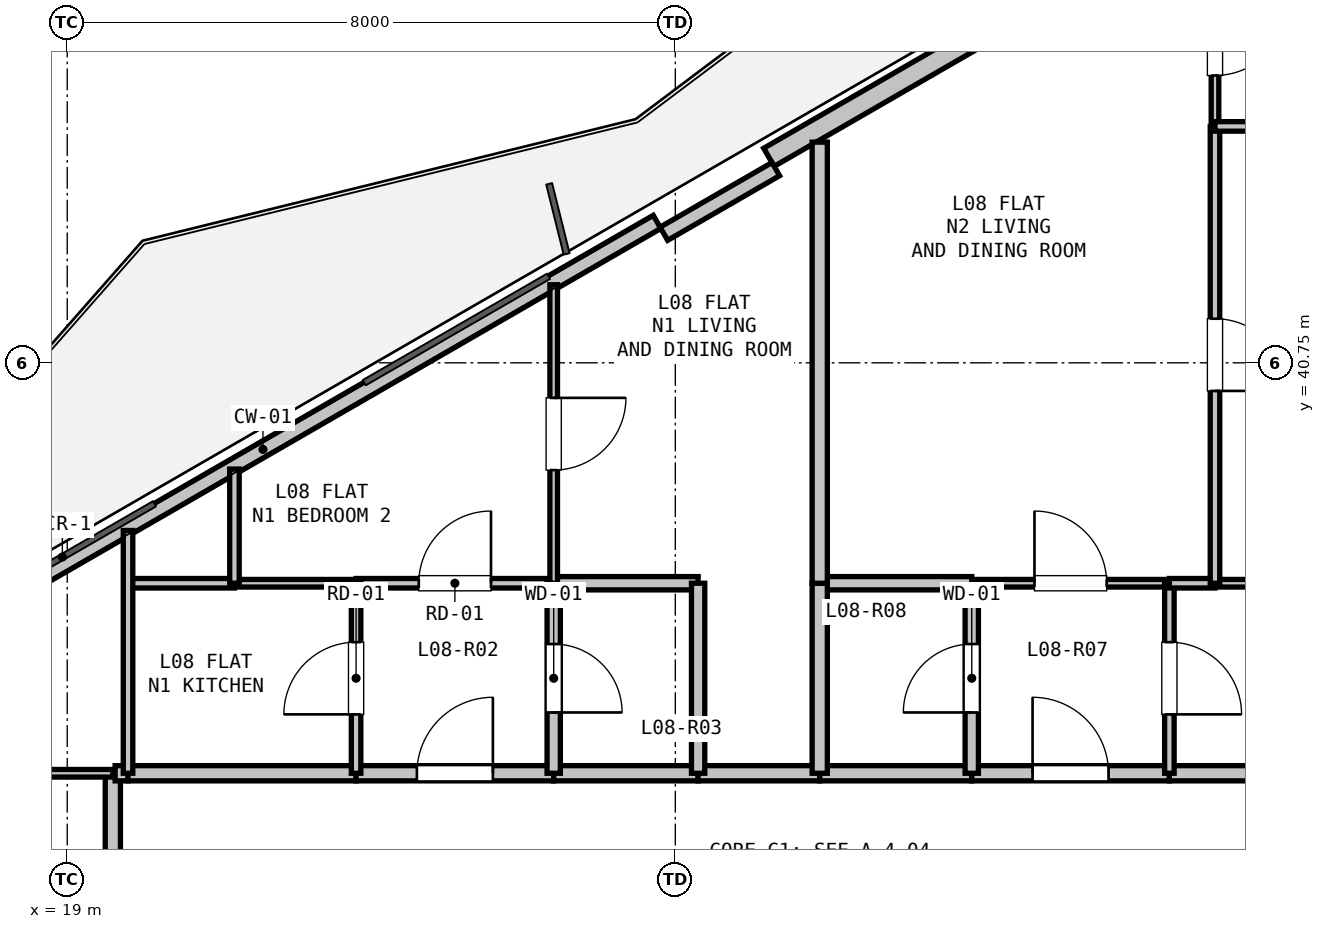
"""IFC4 building model, lengths in metres.
Left out: names, types, materials, properties, quantities, classifications, styles, units other than length and angle.
Written with IfcOpenShell. Run it as: python <this file> out.ifc"""

import sys

from ifc_helpers import new_model, si_unit, direction, frame, frame_2d, origin, place, context, subcontext, project, spatial, rectangle, extrude, element, fill, save


model = new_model("IFC4")
c1 = context("Model", 3, precision=1e-05, world=origin(), true_north=direction((0.0, 1.0)))
c2 = subcontext(c1, "Body", "Model", "MODEL_VIEW")
j1 = project(units=[si_unit("LENGTHUNIT", "METRE"), si_unit("PLANEANGLEUNIT", "RADIAN")], contexts=[c1])
p1 = place(None, origin())
s1 = spatial("IfcSite", under=j1, at=p1, CompositionType="ELEMENT")
p2 = place(p1, origin())
s2 = spatial("IfcBuilding", under=s1, at=p2, CompositionType="ELEMENT")
p3 = place(p2, frame((0.0, 0.0, 32.4)))
s3 = spatial("IfcBuildingStorey", under=s2, at=p3, CompositionType="ELEMENT", Elevation=32.4)
p4 = place(p3, frame((16.39, 36.617, 0.0), z_axis=(0.0, 0.0, 1.0), x_axis=(0.866027351828, 0.499996625875, 0.0)))
e1 = element("IfcWall", 1, at=p4, inside=s3, PredefinedType="PARAPET", context=c2, shape_type="SweptSolid", body=[
    extrude(rectangle(XDim=11.973, YDim=0.2, at=frame_2d((5.987, 0.0))), origin(), (0.0, 0.0, 1.0), 0.2),
])
p5 = place(p3, frame((28.232, 43.454, 0.0), z_axis=(0.0, 0.0, 1.0), x_axis=(0.86603192154, 0.499988710747, 0.0)))
e2 = element("IfcWall", 2, at=p5, inside=s3, PredefinedType="SOLIDWALL", context=c2, shape_type="SweptSolid", body=[
    extrude(rectangle(XDim=12.673, YDim=0.275, at=frame_2d((6.336, 0.0))), origin(), (0.0, 0.0, 1.0), 2.66),
])
p6 = place(p5, frame((2.96, 0.0, 0.9)))
e3 = element("IfcOpeningElement", 3, at=p6, cuts=e2, PredefinedType="OPENING", context=c2, shape_type="SweptSolid", body=[
    extrude(rectangle(XDim=2.1, YDim=1.6, at=frame_2d((1.05, 0.8))), frame((0.0, 0.147, 0.0), z_axis=(0.0, -1.0, 0.0), x_axis=(1.0, 0.0, 0.0)), (0.0, 0.0, 1.0), 0.295),
])
p7 = place(p3, frame((26.85, 42.448, 0.0), z_axis=(0.0, 0.0, 1.0), x_axis=(0.86605165483, 0.499954529098, 0.0)))
e4 = element("IfcWall", 4, at=p7, inside=s3, PredefinedType="PARAPET", context=c2, shape_type="SweptSolid", body=[
    extrude(rectangle(XDim=1.7, YDim=0.2, at=frame_2d((0.85, 0.0))), origin(), (0.0, 0.0, 1.0), 2.66),
])
p8 = place(p3, frame((19.6, 31.45, 0.0), z_axis=(0.0, 0.0, 1.0), x_axis=(0.0, 1.0, 0.0)))
e5 = element("IfcWall", 5, at=p8, inside=s3, PredefinedType="PARTITIONING", context=c2, shape_type="SweptSolid", body=[
    extrude(rectangle(XDim=3.9, YDim=0.2, at=frame_2d((1.95, 0.0))), origin(), (0.0, 0.0, 1.0), 2.338),
])
p9 = place(p3, frame((19.63, 35.35, 0.0), z_axis=(0.0, 0.0, 1.0), x_axis=(1.0, 0.0, 0.0)))
e6 = element("IfcWall", 6, at=p9, inside=s3, PredefinedType="PARTITIONING", context=c2, shape_type="SweptSolid", body=[
    extrude(rectangle(XDim=0.17, YDim=0.2, at=frame_2d((0.085, 0.0))), origin(), (0.0, 0.0, 1.0), 3.04),
])
p10 = place(p3, frame((19.8, 35.35, 0.0), z_axis=(0.0, 0.0, 1.0), x_axis=(1.0, 0.0, 0.0)))
e7 = element("IfcWall", 7, at=p10, inside=s3, PredefinedType="PARTITIONING", context=c2, shape_type="SweptSolid", body=[
    extrude(rectangle(XDim=3.0, YDim=0.2, at=frame_2d((1.5, 0.0))), origin(), (0.0, 0.0, 1.0), 3.04),
])
p11 = place(p3, frame((22.8, 35.35, 0.0), z_axis=(0.0, 0.0, 1.0), x_axis=(1.0, 0.0, 0.0)))
e8 = element("IfcWall", 8, at=p11, inside=s3, PredefinedType="PARTITIONING", context=c2, shape_type="SweptSolid", body=[
    extrude(rectangle(XDim=2.6, YDim=0.2, at=frame_2d((1.3, 0.0))), origin(), (0.0, 0.0, 1.0), 3.04),
])
p12 = place(p11, frame((0.8, 0.0, 0.0)))
e9 = element("IfcOpeningElement", 9, at=p12, cuts=e8, PredefinedType="OPENING", context=c2, shape_type="SweptSolid", body=[
    extrude(rectangle(XDim=1.0, YDim=2.15, at=frame_2d((0.5, 1.075))), frame((0.0, 0.11, 0.0), z_axis=(0.0, -1.0, 0.0), x_axis=(1.0, 0.0, 0.0)), (0.0, 0.0, 1.0), 0.22),
])
p13 = place(p3, frame((25.4, 35.35, 0.0), z_axis=(0.0, 0.0, 1.0), x_axis=(1.0, 0.0, 0.0)))
e10 = element("IfcWall", 10, at=p13, inside=s3, PredefinedType="PARTITIONING", context=c2, shape_type="SweptSolid", body=[
    extrude(rectangle(XDim=1.9, YDim=0.2, at=frame_2d((0.95, 0.0))), origin(), (0.0, 0.0, 1.0), 3.04),
])
p14 = place(p3, frame((27.3, 35.35, 0.0), z_axis=(0.0, 0.0, 1.0), x_axis=(1.0, 0.0, 0.0)))
e11 = element("IfcWall", 11, at=p14, inside=s3, PredefinedType="PARTITIONING", context=c2, shape_type="SweptSolid", body=[
    extrude(rectangle(XDim=1.6, YDim=0.2, at=frame_2d((0.8, 0.0))), origin(), (0.0, 0.0, 1.0), 3.04),
])
p15 = place(p3, frame((28.9, 35.35, 0.0), z_axis=(0.0, 0.0, 1.0), x_axis=(1.0, 0.0, 0.0)))
e12 = element("IfcWall", 12, at=p15, inside=s3, PredefinedType="PARTITIONING", context=c2, shape_type="SweptSolid", body=[
    extrude(rectangle(XDim=2.0, YDim=0.2, at=frame_2d((1.0, 0.0))), origin(), (0.0, 0.0, 1.0), 3.04),
])
p16 = place(p3, frame((30.9, 35.35, 0.0), z_axis=(0.0, 0.0, 1.0), x_axis=(1.0, 0.0, 0.0)))
e13 = element("IfcWall", 13, at=p16, inside=s3, PredefinedType="PARTITIONING", context=c2, shape_type="SweptSolid", body=[
    extrude(rectangle(XDim=2.6, YDim=0.2, at=frame_2d((1.3, 0.0))), origin(), (0.0, 0.0, 1.0), 3.04),
])
p17 = place(p16, frame((0.8, 0.0, 0.0)))
e14 = element("IfcOpeningElement", 14, at=p17, cuts=e13, PredefinedType="OPENING", context=c2, shape_type="SweptSolid", body=[
    extrude(rectangle(XDim=1.0, YDim=2.15, at=frame_2d((0.5, 1.075))), frame((0.0, 0.11, 0.0), z_axis=(0.0, -1.0, 0.0), x_axis=(1.0, 0.0, 0.0)), (0.0, 0.0, 1.0), 0.22),
])
p18 = place(p3, frame((33.5, 35.35, 0.0), z_axis=(0.0, 0.0, 1.0), x_axis=(1.0, 0.0, 0.0)))
e15 = element("IfcWall", 15, at=p18, inside=s3, PredefinedType="PARTITIONING", context=c2, shape_type="SweptSolid", body=[
    extrude(rectangle(XDim=2.3, YDim=0.2, at=frame_2d((1.15, 0.0))), origin(), (0.0, 0.0, 1.0), 3.04),
])
p19 = place(p3, frame((22.8, 37.85, 0.0), z_axis=(0.0, 0.0, 1.0), x_axis=(1.0, 0.0, 0.0)))
e16 = element("IfcWall", 16, at=p19, inside=s3, PredefinedType="PARTITIONING", context=c2, shape_type="SweptSolid", body=[
    extrude(rectangle(XDim=2.6, YDim=0.125, at=frame_2d((1.3, 0.0))), origin(), (0.0, 0.0, 1.0), 3.04),
])
p20 = place(p19, frame((0.825, 0.0, 0.0)))
e17 = element("IfcOpeningElement", 17, at=p20, cuts=e16, PredefinedType="OPENING", context=c2, shape_type="SweptSolid", body=[
    extrude(rectangle(XDim=0.95, YDim=2.1, at=frame_2d((0.475, 1.05))), frame((0.0, 0.073, 0.0), z_axis=(0.0, -1.0, 0.0), x_axis=(1.0, 0.0, 0.0)), (0.0, 0.0, 1.0), 0.145),
])
p21 = place(p3, frame((25.4, 37.85, 0.0), z_axis=(0.0, 0.0, 1.0), x_axis=(0.0, -1.0, 0.0)))
e18 = element("IfcWall", 18, at=p21, inside=s3, PredefinedType="PLUMBINGWALL", context=c2, shape_type="SweptSolid", body=[
    extrude(rectangle(XDim=2.5, YDim=0.175, at=frame_2d((1.25, 0.0))), origin(), (0.0, 0.0, 1.0), 3.04),
])
p22 = place(p21, frame((0.8, 0.0, 0.0)))
e19 = element("IfcOpeningElement", 19, at=p22, cuts=e18, PredefinedType="OPENING", context=c2, shape_type="SweptSolid", body=[
    extrude(rectangle(XDim=0.9, YDim=2.1, at=frame_2d((0.45, 1.05))), frame((0.0, 0.097, 0.0), z_axis=(0.0, -1.0, 0.0), x_axis=(1.0, 0.0, 0.0)), (0.0, 0.0, 1.0), 0.195),
])
p23 = place(p3, frame((22.8, 35.35, 0.0), z_axis=(0.0, 0.0, 1.0), x_axis=(0.0, 1.0, 0.0)))
e20 = element("IfcWall", 20, at=p23, inside=s3, PredefinedType="PARTITIONING", context=c2, shape_type="SweptSolid", body=[
    extrude(rectangle(XDim=2.5, YDim=0.125, at=frame_2d((1.25, 0.0))), origin(), (0.0, 0.0, 1.0), 3.04),
])
p24 = place(p23, frame((0.775, 0.0, 0.0)))
e21 = element("IfcOpeningElement", 21, at=p24, cuts=e20, PredefinedType="OPENING", context=c2, shape_type="SweptSolid", body=[
    extrude(rectangle(XDim=0.95, YDim=2.1, at=frame_2d((0.475, 1.05))), frame((0.0, 0.073, 0.0), z_axis=(0.0, -1.0, 0.0), x_axis=(1.0, 0.0, 0.0)), (0.0, 0.0, 1.0), 0.145),
])
p25 = place(p3, frame((30.9, 37.85, 0.0), z_axis=(0.0, 0.0, 1.0), x_axis=(1.0, 0.0, 0.0)))
e22 = element("IfcWall", 22, at=p25, inside=s3, PredefinedType="PARTITIONING", context=c2, shape_type="SweptSolid", body=[
    extrude(rectangle(XDim=2.6, YDim=0.1, at=frame_2d((1.3, 0.0))), origin(), (0.0, 0.0, 1.0), 3.04),
])
p26 = place(p25, frame((0.825, 0.0, 0.0)))
e23 = element("IfcOpeningElement", 23, at=p26, cuts=e22, PredefinedType="OPENING", context=c2, shape_type="SweptSolid", body=[
    extrude(rectangle(XDim=0.95, YDim=2.1, at=frame_2d((0.475, 1.05))), frame((0.0, 0.06, 0.0), z_axis=(0.0, -1.0, 0.0), x_axis=(1.0, 0.0, 0.0)), (0.0, 0.0, 1.0), 0.12),
])
p27 = place(p3, frame((33.5, 37.85, 0.0), z_axis=(0.0, 0.0, 1.0), x_axis=(0.0, -1.0, 0.0)))
e24 = element("IfcWall", 24, at=p27, inside=s3, PredefinedType="PARTITIONING", context=c2, shape_type="SweptSolid", body=[
    extrude(rectangle(XDim=2.5, YDim=0.125, at=frame_2d((1.25, 0.0))), origin(), (0.0, 0.0, 1.0), 3.04),
])
p28 = place(p27, frame((0.775, 0.0, 0.0)))
e25 = element("IfcOpeningElement", 25, at=p28, cuts=e24, PredefinedType="OPENING", context=c2, shape_type="SweptSolid", body=[
    extrude(rectangle(XDim=0.95, YDim=2.1, at=frame_2d((0.475, 1.05))), frame((0.0, 0.073, 0.0), z_axis=(0.0, -1.0, 0.0), x_axis=(1.0, 0.0, 0.0)), (0.0, 0.0, 1.0), 0.145),
])
p29 = place(p3, frame((30.9, 35.35, 0.0), z_axis=(0.0, 0.0, 1.0), x_axis=(0.0, 1.0, 0.0)))
e26 = element("IfcWall", 26, at=p29, inside=s3, PredefinedType="PLUMBINGWALL", context=c2, shape_type="SweptSolid", body=[
    extrude(rectangle(XDim=2.5, YDim=0.175, at=frame_2d((1.25, 0.0))), origin(), (0.0, 0.0, 1.0), 3.04),
])
p30 = place(p29, frame((0.8, 0.0, 0.0)))
e27 = element("IfcOpeningElement", 27, at=p30, cuts=e26, PredefinedType="OPENING", context=c2, shape_type="SweptSolid", body=[
    extrude(rectangle(XDim=0.9, YDim=2.1, at=frame_2d((0.45, 1.05))), frame((0.0, 0.097, 0.0), z_axis=(0.0, -1.0, 0.0), x_axis=(1.0, 0.0, 0.0)), (0.0, 0.0, 1.0), 0.195),
])
p31 = place(p3, frame((25.4, 37.85, 0.0), z_axis=(0.0, 0.0, 1.0), x_axis=(1.0, 0.0, 0.0)))
e28 = element("IfcWall", 28, at=p31, inside=s3, PredefinedType="PLUMBINGWALL", context=c2, shape_type="SweptSolid", body=[
    extrude(rectangle(XDim=1.9, YDim=0.175, at=frame_2d((0.95, 0.0))), origin(), (0.0, 0.0, 1.0), 3.04),
])
p32 = place(p3, frame((27.3, 37.85, 0.0), z_axis=(0.0, 0.0, 1.0), x_axis=(0.0, -1.0, 0.0)))
e29 = element("IfcWall", 29, at=p32, inside=s3, PredefinedType="PLUMBINGWALL", context=c2, shape_type="SweptSolid", body=[
    extrude(rectangle(XDim=2.5, YDim=0.175, at=frame_2d((1.25, 0.0))), origin(), (0.0, 0.0, 1.0), 3.04),
])
p33 = place(p3, frame((19.8, 37.85, 0.0), z_axis=(0.0, 0.0, 1.0), x_axis=(1.0, 0.0, 0.0)))
e30 = element("IfcWall", 30, at=p33, inside=s3, PredefinedType="PARTITIONING", context=c2, shape_type="SweptSolid", body=[
    extrude(rectangle(XDim=1.4, YDim=0.125, at=frame_2d((0.7, 0.0))), origin(), (0.0, 0.0, 1.0), 2.365),
])
p34 = place(p3, frame((21.2, 37.85, 0.0), z_axis=(0.0, 0.0, 1.0), x_axis=(1.0, 0.0, 0.0)))
e31 = element("IfcWall", 31, at=p34, inside=s3, PredefinedType="PARTITIONING", context=c2, shape_type="SweptSolid", body=[
    extrude(rectangle(XDim=1.6, YDim=0.1, at=frame_2d((0.8, 0.0))), origin(), (0.0, 0.0, 1.0), 3.04),
])
p35 = place(p3, frame((19.8, 35.35, 0.0), z_axis=(0.0, 0.0, 1.0), x_axis=(0.0, 1.0, 0.0)))
e32 = element("IfcWall", 32, at=p35, inside=s3, PredefinedType="PARTITIONING", context=c2, shape_type="SweptSolid", body=[
    extrude(rectangle(XDim=3.194, YDim=0.125, at=frame_2d((1.597, 0.0))), origin(), (0.0, 0.0, 1.0), 2.365),
])
p36 = place(p3, frame((28.9, 37.85, 0.0), z_axis=(0.0, 0.0, 1.0), x_axis=(1.0, 0.0, 0.0)))
e33 = element("IfcWall", 33, at=p36, inside=s3, PredefinedType="PLUMBINGWALL", context=c2, shape_type="SweptSolid", body=[
    extrude(rectangle(XDim=2.0, YDim=0.175, at=frame_2d((1.0, 0.0))), origin(), (0.0, 0.0, 1.0), 3.04),
])
p37 = place(p3, frame((28.9, 35.35, 0.0), z_axis=(0.0, 0.0, 1.0), x_axis=(0.0, 1.0, 0.0)))
e34 = element("IfcWall", 34, at=p37, inside=s3, PredefinedType="PARTITIONING", context=c2, shape_type="SweptSolid", body=[
    extrude(rectangle(XDim=2.5, YDim=0.2, at=frame_2d((1.25, 0.0))), origin(), (0.0, 0.0, 1.0), 3.04),
])
p38 = place(p3, frame((33.5, 37.85, 0.0), z_axis=(0.0, 0.0, 1.0), x_axis=(1.0, 0.0, 0.0)))
e35 = element("IfcWall", 35, at=p38, inside=s3, PredefinedType="PARTITIONING", context=c2, shape_type="SweptSolid", body=[
    extrude(rectangle(XDim=0.6, YDim=0.125, at=frame_2d((0.3, 0.0))), origin(), (0.0, 0.0, 1.0), 3.04),
])
p39 = place(p3, frame((34.1, 37.85, 0.0), z_axis=(0.0, 0.0, 1.0), x_axis=(1.0, 0.0, 0.0)))
e36 = element("IfcWall", 36, at=p39, inside=s3, PredefinedType="PARTITIONING", context=c2, shape_type="SweptSolid", body=[
    extrude(rectangle(XDim=4.88, YDim=0.1, at=frame_2d((2.44, 0.0))), origin(), (0.0, 0.0, 1.0), 2.338),
])
p40 = place(p3, frame((17.15, 35.35, 0.0), z_axis=(0.0, 0.0, 1.0), x_axis=(1.0, 0.0, 0.0)))
e37 = element("IfcWall", 37, at=p40, inside=s3, PredefinedType="PARTITIONING", context=c2, shape_type="SweptSolid", body=[
    extrude(rectangle(XDim=2.45, YDim=0.1, at=frame_2d((1.225, 0.0))), origin(), (0.0, 0.0, 1.0), 3.04),
])
p41 = place(p3, frame((21.2, 37.85, 0.0), z_axis=(0.0, 0.0, 1.0), x_axis=(0.0, 1.0, 0.0)))
e38 = element("IfcWall", 38, at=p41, inside=s3, PredefinedType="PARTITIONING", context=c2, shape_type="SweptSolid", body=[
    extrude(rectangle(XDim=1.502, YDim=0.125, at=frame_2d((0.751, 0.0))), origin(), (0.0, 0.0, 1.0), 2.365),
])
p42 = place(p3, frame((25.4, 41.777, 0.0), z_axis=(0.0, 0.0, 1.0), x_axis=(0.0, -1.0, 0.0)))
e39 = element("IfcWall", 39, at=p42, inside=s3, PredefinedType="PARTITIONING", context=c2, shape_type="SweptSolid", body=[
    extrude(rectangle(XDim=3.927, YDim=0.1, at=frame_2d((1.964, 0.0))), origin(), (0.0, 0.0, 1.0), 2.365),
])
p43 = place(p42, frame((1.489, 0.0, 0.0)))
e40 = element("IfcOpeningElement", 40, at=p43, cuts=e39, PredefinedType="OPENING", context=c2, shape_type="SweptSolid", body=[
    extrude(rectangle(XDim=0.95, YDim=2.1, at=frame_2d((0.475, 1.05))), frame((0.0, 0.06, 0.0), z_axis=(0.0, -1.0, 0.0), x_axis=(1.0, 0.0, 0.0)), (0.0, 0.0, 1.0), 0.12),
])
p44 = place(p3, frame((28.9, 43.653, 0.0), z_axis=(0.0, 0.0, 1.0), x_axis=(0.0, -1.0, 0.0)))
e41 = element("IfcWall", 41, at=p44, inside=s3, PredefinedType="PARTITIONING", context=c2, shape_type="SweptSolid", body=[
    extrude(rectangle(XDim=5.803, YDim=0.2, at=frame_2d((2.901, 0.0))), origin(), (0.0, 0.0, 1.0), 2.365),
])
p45 = place(p3, frame((34.1, 46.655, 0.0), z_axis=(0.0, 0.0, 1.0), x_axis=(0.0, -1.0, 0.0)))
e42 = element("IfcWall", 42, at=p45, inside=s3, PredefinedType="PARTITIONING", context=c2, shape_type="SweptSolid", body=[
    extrude(rectangle(XDim=2.795, YDim=0.1, at=frame_2d((1.397, 0.0))), origin(), (0.0, 0.0, 1.0), 3.04),
])
p46 = place(p45, frame((1.175, 0.0, 0.0)))
e43 = element("IfcOpeningElement", 43, at=p46, cuts=e42, PredefinedType="OPENING", context=c2, shape_type="SweptSolid", body=[
    extrude(rectangle(XDim=0.95, YDim=2.1, at=frame_2d((0.475, 1.05))), frame((0.0, 0.06, 0.0), z_axis=(0.0, -1.0, 0.0), x_axis=(1.0, 0.0, 0.0)), (0.0, 0.0, 1.0), 0.12),
])
p47 = place(p3, frame((34.1, 43.86, 0.0), z_axis=(0.0, 0.0, 1.0), x_axis=(0.0, -1.0, 0.0)))
e44 = element("IfcWall", 44, at=p47, inside=s3, PredefinedType="PARTITIONING", context=c2, shape_type="SweptSolid", body=[
    extrude(rectangle(XDim=6.01, YDim=0.125, at=frame_2d((3.005, 0.0))), origin(), (0.0, 0.0, 1.0), 3.04),
])
p48 = place(p47, frame((2.53, 0.0, 0.0)))
e45 = element("IfcOpeningElement", 45, at=p48, cuts=e44, PredefinedType="OPENING", context=c2, shape_type="SweptSolid", body=[
    extrude(rectangle(XDim=0.95, YDim=2.1, at=frame_2d((0.475, 1.05))), frame((0.0, 0.073, 0.0), z_axis=(0.0, -1.0, 0.0), x_axis=(1.0, 0.0, 0.0)), (0.0, 0.0, 1.0), 0.145),
])
p49 = place(p3, frame((34.1, 43.86, 0.0), z_axis=(0.0, 0.0, 1.0), x_axis=(1.0, 0.0, 0.0)))
e46 = element("IfcWall", 46, at=p49, inside=s3, PredefinedType="PARTITIONING", context=c2, shape_type="SweptSolid", body=[
    extrude(rectangle(XDim=4.88, YDim=0.125, at=frame_2d((2.44, 0.0))), origin(), (0.0, 0.0, 1.0), 2.338),
])
p50 = place(p49, frame((1.965, 0.0, 0.0)))
e47 = element("IfcOpeningElement", 47, at=p50, cuts=e46, PredefinedType="OPENING", context=c2, shape_type="SweptSolid", body=[
    extrude(rectangle(XDim=0.95, YDim=2.1, at=frame_2d((0.475, 1.05))), frame((0.0, 0.073, 0.0), z_axis=(0.0, -1.0, 0.0), x_axis=(1.0, 0.0, 0.0)), (0.0, 0.0, 1.0), 0.145),
])
p51 = place(p12, origin())
e48 = element("IfcDoor", 48, at=p51, inside=s3, OperationType="SINGLE_SWING_RIGHT", PredefinedType="DOOR", context=c2, shape_type="SweptSolid", body=[
    extrude(rectangle(XDim=1.0, YDim=2.15, at=frame_2d((0.5, 1.075))), frame((0.0, 0.025, 0.0), z_axis=(0.0, -1.0, 0.0), x_axis=(1.0, 0.0, 0.0)), (0.0, 0.0, 1.0), 0.05),
])
fill(e9, e48)
p52 = place(p17, origin())
e49 = element("IfcDoor", 49, at=p52, inside=s3, OperationType="SINGLE_SWING_LEFT", PredefinedType="DOOR", context=c2, shape_type="SweptSolid", body=[
    extrude(rectangle(XDim=1.0, YDim=2.15, at=frame_2d((0.5, 1.075))), frame((0.0, 0.025, 0.0), z_axis=(0.0, -1.0, 0.0), x_axis=(1.0, 0.0, 0.0)), (0.0, 0.0, 1.0), 0.05),
])
fill(e14, e49)
p53 = place(p22, origin())
e50 = element("IfcDoor", 50, at=p53, inside=s3, OperationType="SINGLE_SWING_RIGHT", PredefinedType="DOOR", context=c2, shape_type="SweptSolid", body=[
    extrude(rectangle(XDim=0.9, YDim=2.1, at=frame_2d((0.45, 1.05))), frame((0.0, 0.025, 0.0), z_axis=(0.0, -1.0, 0.0), x_axis=(1.0, 0.0, 0.0)), (0.0, 0.0, 1.0), 0.05),
])
fill(e19, e50)
p54 = place(p24, origin())
e51 = element("IfcDoor", 51, at=p54, inside=s3, OperationType="SINGLE_SWING_LEFT", PredefinedType="DOOR", context=c2, shape_type="SweptSolid", body=[
    extrude(rectangle(XDim=0.95, YDim=2.1, at=frame_2d((0.475, 1.05))), frame((0.0, 0.025, 0.0), z_axis=(0.0, -1.0, 0.0), x_axis=(1.0, 0.0, 0.0)), (0.0, 0.0, 1.0), 0.05),
])
fill(e21, e51)
p55 = place(p20, origin())
e52 = element("IfcDoor", 52, at=p55, inside=s3, OperationType="SINGLE_SWING_RIGHT", PredefinedType="DOOR", context=c2, shape_type="SweptSolid", body=[
    extrude(rectangle(XDim=0.95, YDim=2.1, at=frame_2d((0.475, 1.05))), frame((0.0, 0.025, 0.0), z_axis=(0.0, -1.0, 0.0), x_axis=(1.0, 0.0, 0.0)), (0.0, 0.0, 1.0), 0.05),
])
fill(e17, e52)
p56 = place(p30, origin())
e53 = element("IfcDoor", 53, at=p56, inside=s3, OperationType="SINGLE_SWING_LEFT", PredefinedType="DOOR", context=c2, shape_type="SweptSolid", body=[
    extrude(rectangle(XDim=0.9, YDim=2.1, at=frame_2d((0.45, 1.05))), frame((0.0, 0.025, 0.0), z_axis=(0.0, -1.0, 0.0), x_axis=(1.0, 0.0, 0.0)), (0.0, 0.0, 1.0), 0.05),
])
fill(e27, e53)
p57 = place(p28, origin())
e54 = element("IfcDoor", 54, at=p57, inside=s3, OperationType="SINGLE_SWING_RIGHT", PredefinedType="DOOR", context=c2, shape_type="SweptSolid", body=[
    extrude(rectangle(XDim=0.95, YDim=2.1, at=frame_2d((0.475, 1.05))), frame((0.0, 0.025, 0.0), z_axis=(0.0, -1.0, 0.0), x_axis=(1.0, 0.0, 0.0)), (0.0, 0.0, 1.0), 0.05),
])
fill(e25, e54)
p58 = place(p26, origin())
e55 = element("IfcDoor", 55, at=p58, inside=s3, OperationType="SINGLE_SWING_LEFT", PredefinedType="DOOR", context=c2, shape_type="SweptSolid", body=[
    extrude(rectangle(XDim=0.95, YDim=2.1, at=frame_2d((0.475, 1.05))), frame((0.0, 0.025, 0.0), z_axis=(0.0, -1.0, 0.0), x_axis=(1.0, 0.0, 0.0)), (0.0, 0.0, 1.0), 0.05),
])
fill(e23, e55)
p59 = place(p43, origin())
e56 = element("IfcDoor", 56, at=p59, inside=s3, OperationType="SINGLE_SWING_LEFT", PredefinedType="DOOR", context=c2, shape_type="SweptSolid", body=[
    extrude(rectangle(XDim=0.95, YDim=2.1, at=frame_2d((0.475, 1.05))), frame((0.0, 0.025, 0.0), z_axis=(0.0, -1.0, 0.0), x_axis=(1.0, 0.0, 0.0)), (0.0, 0.0, 1.0), 0.05),
])
fill(e40, e56)
p60 = place(p48, origin())
e57 = element("IfcDoor", 57, at=p60, inside=s3, OperationType="SINGLE_SWING_RIGHT", PredefinedType="DOOR", context=c2, shape_type="SweptSolid", body=[
    extrude(rectangle(XDim=0.95, YDim=2.1, at=frame_2d((0.475, 1.05))), frame((0.0, 0.025, 0.0), z_axis=(0.0, -1.0, 0.0), x_axis=(1.0, 0.0, 0.0)), (0.0, 0.0, 1.0), 0.05),
])
fill(e45, e57)
p61 = place(p46, origin())
e58 = element("IfcDoor", 58, at=p61, inside=s3, OperationType="SINGLE_SWING_LEFT", PredefinedType="DOOR", context=c2, shape_type="SweptSolid", body=[
    extrude(rectangle(XDim=0.95, YDim=2.1, at=frame_2d((0.475, 1.05))), frame((0.0, 0.025, 0.0), z_axis=(0.0, -1.0, 0.0), x_axis=(1.0, 0.0, 0.0)), (0.0, 0.0, 1.0), 0.05),
])
fill(e43, e58)
save(model, sys.argv[1])
